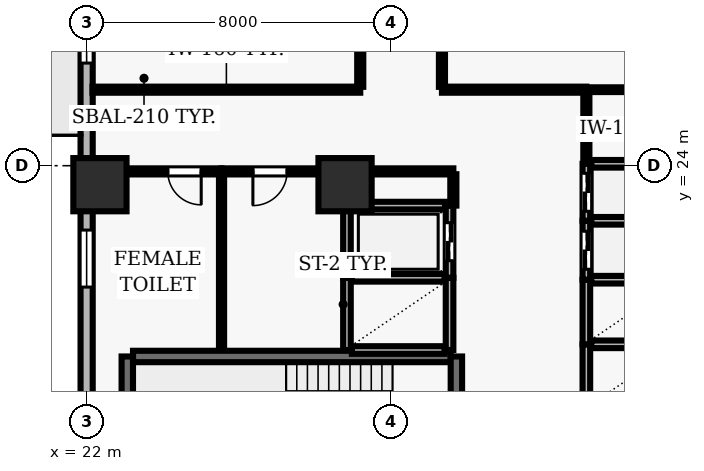
"""IFC4 building model, lengths in metres.
Left out: names, types, materials, properties, quantities, classifications, styles, units other than length and angle.
Written with IfcOpenShell. Run it as: python <this file> out.ifc"""

import sys

from ifc_helpers import new_model, si_unit, direction, frame, frame_2d, origin, origin_2d, place, context, subcontext, project, spatial, rectangle, extrude, element, fill, save


model = new_model("IFC4")
c1 = context("Model", 3, precision=1e-05, world=origin(), true_north=direction((0.0, 1.0)))
c2 = subcontext(c1, "Body", "Model", "MODEL_VIEW")
j1 = project(units=[si_unit("LENGTHUNIT", "METRE"), si_unit("PLANEANGLEUNIT", "RADIAN")], contexts=[c1])
p1 = place(None, origin())
s1 = spatial("IfcSite", under=j1, at=p1, CompositionType="ELEMENT")
p2 = place(p1, origin())
s2 = spatial("IfcBuilding", under=s1, at=p2, CompositionType="ELEMENT")
p3 = place(p2, frame((0.0, 0.0, 73.9)))
s3 = spatial("IfcBuildingStorey", under=s2, at=p3, CompositionType="ELEMENT", Elevation=73.9)
for number, where, z_axis, x_axis in (
    (1, (22.35, 23.5, 0.0), (0.0, 0.0, 1.0), (1.0, 0.0, 0.0)),
    (2, (28.8, 23.5, 0.0), (0.0, 0.0, 1.0), (1.0, 0.0, 0.0)),
):
    element("IfcColumn", number, at=place(p3, frame(where, z_axis=z_axis, x_axis=x_axis)), inside=s3, PredefinedType="COLUMN", context=c2, shape_type="SweptSolid", body=[
        extrude(rectangle(XDim=1.4, YDim=1.4, at=origin_2d()), origin(), (0.0, 0.0, 1.0), 3.9),
    ])
p4 = place(p3, frame((22.0, 51.5, 0.0), z_axis=(0.0, 0.0, 1.0), x_axis=(0.0, -1.0, 0.0)))
e3 = element("IfcWall", 3, at=p4, inside=s3, PredefinedType="SOLIDWALL", context=c2, shape_type="SweptSolid", body=[
    extrude(rectangle(XDim=49.0, YDim=0.32, at=frame_2d((24.5, 0.0))), origin(), (0.0, 0.0, 1.0), 3.69),
])
p5 = place(p4, frame((12.1, 0.0, 0.0)))
e4 = element("IfcOpeningElement", 4, at=p5, cuts=e3, PredefinedType="OPENING", context=c2, shape_type="SweptSolid", body=[
    extrude(rectangle(XDim=1.0, YDim=2.2, at=frame_2d((0.5, 1.1))), frame((0.0, 0.17, 0.0), z_axis=(0.0, -1.0, 0.0), x_axis=(1.0, 0.0, 0.0)), (0.0, 0.0, 1.0), 0.34),
])
p6 = place(p4, frame((1.972, 0.0, 0.9)))
e5 = element("IfcOpeningElement", 5, at=p6, cuts=e3, PredefinedType="OPENING", context=c2, shape_type="SweptSolid", body=[
    extrude(rectangle(XDim=1.5, YDim=1.8, at=frame_2d((0.75, 0.9))), frame((0.0, 0.17, 0.0), z_axis=(0.0, -1.0, 0.0), x_axis=(1.0, 0.0, 0.0)), (0.0, 0.0, 1.0), 0.34),
])
p7 = place(p4, frame((7.417, 0.0, 0.9)))
e6 = element("IfcOpeningElement", 6, at=p7, cuts=e3, PredefinedType="OPENING", context=c2, shape_type="SweptSolid", body=[
    extrude(rectangle(XDim=1.5, YDim=1.8, at=frame_2d((0.75, 0.9))), frame((0.0, 0.17, 0.0), z_axis=(0.0, -1.0, 0.0), x_axis=(1.0, 0.0, 0.0)), (0.0, 0.0, 1.0), 0.34),
])
p8 = place(p4, frame((18.306, 0.0, 0.9)))
e7 = element("IfcOpeningElement", 7, at=p8, cuts=e3, PredefinedType="OPENING", context=c2, shape_type="SweptSolid", body=[
    extrude(rectangle(XDim=1.5, YDim=1.8, at=frame_2d((0.75, 0.9))), frame((0.0, 0.17, 0.0), z_axis=(0.0, -1.0, 0.0), x_axis=(1.0, 0.0, 0.0)), (0.0, 0.0, 1.0), 0.34),
])
p9 = place(p4, frame((23.3, 0.0, 0.9)))
e8 = element("IfcOpeningElement", 8, at=p9, cuts=e3, PredefinedType="OPENING", context=c2, shape_type="SweptSolid", body=[
    extrude(rectangle(XDim=1.5, YDim=1.8, at=frame_2d((0.75, 0.9))), frame((0.0, 0.17, 0.0), z_axis=(0.0, -1.0, 0.0), x_axis=(1.0, 0.0, 0.0)), (0.0, 0.0, 1.0), 0.34),
])
p10 = place(p4, frame((29.194, 0.0, 0.9)))
e9 = element("IfcOpeningElement", 9, at=p10, cuts=e3, PredefinedType="OPENING", context=c2, shape_type="SweptSolid", body=[
    extrude(rectangle(XDim=1.5, YDim=1.8, at=frame_2d((0.75, 0.9))), frame((0.0, 0.17, 0.0), z_axis=(0.0, -1.0, 0.0), x_axis=(1.0, 0.0, 0.0)), (0.0, 0.0, 1.0), 0.34),
])
p11 = place(p4, frame((34.189, 0.0, 0.9)))
e10 = element("IfcOpeningElement", 10, at=p11, cuts=e3, PredefinedType="OPENING", context=c2, shape_type="SweptSolid", body=[
    extrude(rectangle(XDim=1.5, YDim=1.8, at=frame_2d((0.75, 0.9))), frame((0.0, 0.17, 0.0), z_axis=(0.0, -1.0, 0.0), x_axis=(1.0, 0.0, 0.0)), (0.0, 0.0, 1.0), 0.34),
])
p12 = place(p4, frame((40.083, 0.0, 0.9)))
e11 = element("IfcOpeningElement", 11, at=p12, cuts=e3, PredefinedType="OPENING", context=c2, shape_type="SweptSolid", body=[
    extrude(rectangle(XDim=1.5, YDim=1.8, at=frame_2d((0.75, 0.9))), frame((0.0, 0.17, 0.0), z_axis=(0.0, -1.0, 0.0), x_axis=(1.0, 0.0, 0.0)), (0.0, 0.0, 1.0), 0.34),
])
p13 = place(p3, frame((31.58, 18.98, 0.0), z_axis=(0.0, 0.0, 1.0), x_axis=(-1.0, 0.0, 0.0)))
e12 = element("IfcWall", 12, at=p13, inside=s3, PredefinedType="SHEAR", context=c2, shape_type="SweptSolid", body=[
    extrude(rectangle(XDim=8.36, YDim=0.3, at=frame_2d((4.18, 0.0))), origin(), (0.0, 0.0, 1.0), 3.69),
])
p14 = place(p3, frame((23.07, 18.98, 0.0), z_axis=(0.0, 0.0, 1.0), x_axis=(0.0, -1.0, 0.0)))
e13 = element("IfcWall", 13, at=p14, inside=s3, PredefinedType="SHEAR", context=c2, shape_type="SweptSolid", body=[
    extrude(rectangle(XDim=3.51, YDim=0.3, at=frame_2d((1.755, 0.0))), origin(), (0.0, 0.0, 1.0), 3.69),
])
p15 = place(p3, frame((31.73, 15.47, 0.0), z_axis=(0.0, 0.0, 1.0), x_axis=(0.0, 1.0, 0.0)))
e14 = element("IfcWall", 14, at=p15, inside=s3, PredefinedType="SHEAR", context=c2, shape_type="SweptSolid", body=[
    extrude(rectangle(XDim=3.51, YDim=0.3, at=frame_2d((1.755, 0.0))), origin(), (0.0, 0.0, 1.0), 3.69),
])
p16 = place(p15, frame((1.18, 0.0, 0.0)))
e15 = element("IfcOpeningElement", 15, at=p16, cuts=e14, PredefinedType="OPENING", context=c2, shape_type="SweptSolid", body=[
    extrude(rectangle(XDim=1.15, YDim=2.15, at=frame_2d((0.575, 1.075))), frame((0.0, 0.16, 0.0), z_axis=(0.0, -1.0, 0.0), x_axis=(1.0, 0.0, 0.0)), (0.0, 0.0, 1.0), 0.32),
])
p17 = place(p3, frame((35.15, 19.3, 0.0), z_axis=(0.0, 0.0, 1.0), x_axis=(0.0, -1.0, 0.0)))
e16 = element("IfcWall", 16, at=p17, inside=s3, PredefinedType="SOLIDWALL", context=c2, shape_type="SweptSolid", body=[
    extrude(rectangle(XDim=1.7, YDim=0.2, at=frame_2d((0.85, 0.0))), origin(), (0.0, 0.0, 1.0), 3.69),
])
p18 = place(p3, frame((37.42, 19.3, 0.0), z_axis=(0.0, 0.0, 1.0), x_axis=(-1.0, 0.0, 0.0)))
e17 = element("IfcWall", 17, at=p18, inside=s3, PredefinedType="SOLIDWALL", context=c2, shape_type="SweptSolid", body=[
    extrude(rectangle(XDim=2.14, YDim=0.2, at=frame_2d((1.07, 0.0))), origin(), (0.0, 0.0, 1.0), 3.69),
])
p19 = place(p3, frame((35.15, 21.0, 0.0), z_axis=(0.0, 0.0, 1.0), x_axis=(0.0, -1.0, 0.0)))
e18 = element("IfcWall", 18, at=p19, inside=s3, PredefinedType="SOLIDWALL", context=c2, shape_type="SweptSolid", body=[
    extrude(rectangle(XDim=1.7, YDim=0.2, at=frame_2d((0.85, 0.0))), origin(), (0.0, 0.0, 1.0), 3.69),
])
p20 = place(p3, frame((37.42, 21.0, 0.0), z_axis=(0.0, 0.0, 1.0), x_axis=(-1.0, 0.0, 0.0)))
e19 = element("IfcWall", 19, at=p20, inside=s3, PredefinedType="SOLIDWALL", context=c2, shape_type="SweptSolid", body=[
    extrude(rectangle(XDim=2.14, YDim=0.2, at=frame_2d((1.07, 0.0))), origin(), (0.0, 0.0, 1.0), 3.69),
])
for number, where, z_axis, x_axis in (
    (20, (28.85, 21.05, 0.0), (0.0, 0.0, 1.0), (0.0, -1.0, 0.0)),
    (21, (31.55, 19.15, 0.0), (0.0, 0.0, 1.0), (0.0, 1.0, 0.0)),
):
    element("IfcWall", number, at=place(p3, frame(where, z_axis=z_axis, x_axis=x_axis)), inside=s3, PredefinedType="SOLIDWALL", context=c2, shape_type="SweptSolid", body=[
        extrude(rectangle(XDim=1.9, YDim=0.2, at=frame_2d((0.95, 0.0))), origin(), (0.0, 0.0, 1.0), 3.69),
    ])
for number, where, z_axis, x_axis in (
    (22, (28.98, 19.15, 0.0), (0.0, 0.0, 1.0), (1.0, 0.0, 0.0)),
    (23, (31.42, 21.05, 0.0), (0.0, 0.0, 1.0), (-1.0, 0.0, 0.0)),
):
    element("IfcWall", number, at=place(p3, frame(where, z_axis=z_axis, x_axis=x_axis)), inside=s3, PredefinedType="SOLIDWALL", context=c2, shape_type="SweptSolid", body=[
        extrude(rectangle(XDim=2.44, YDim=0.2, at=frame_2d((1.22, 0.0))), origin(), (0.0, 0.0, 1.0), 3.69),
    ])
p21 = place(p3, frame((35.15, 22.55, 0.0), z_axis=(0.0, 0.0, 1.0), x_axis=(0.0, -1.0, 0.0)))
e24 = element("IfcWall", 24, at=p21, inside=s3, PredefinedType="SOLIDWALL", context=c2, shape_type="SweptSolid", body=[
    extrude(rectangle(XDim=1.55, YDim=0.2, at=frame_2d((0.775, 0.0))), origin(), (0.0, 0.0, 1.0), 3.69),
])
p22 = place(p21, frame((0.275, 0.0, 0.0)))
e25 = element("IfcOpeningElement", 25, at=p22, cuts=e24, PredefinedType="OPENING", context=c2, shape_type="SweptSolid", body=[
    extrude(rectangle(XDim=1.0, YDim=2.1, at=frame_2d((0.5, 1.05))), frame((0.0, 0.11, 0.0), z_axis=(0.0, -1.0, 0.0), x_axis=(1.0, 0.0, 0.0)), (0.0, 0.0, 1.0), 0.22),
])
p23 = place(p3, frame((37.42, 22.55, 0.0), z_axis=(0.0, 0.0, 1.0), x_axis=(-1.0, 0.0, 0.0)))
e26 = element("IfcWall", 26, at=p23, inside=s3, PredefinedType="SOLIDWALL", context=c2, shape_type="SweptSolid", body=[
    extrude(rectangle(XDim=2.14, YDim=0.2, at=frame_2d((1.07, 0.0))), origin(), (0.0, 0.0, 1.0), 3.69),
])
p24 = place(p3, frame((35.15, 24.05, 0.0), z_axis=(0.0, 0.0, 1.0), x_axis=(0.0, -1.0, 0.0)))
e27 = element("IfcWall", 27, at=p24, inside=s3, PredefinedType="SOLIDWALL", context=c2, shape_type="SweptSolid", body=[
    extrude(rectangle(XDim=1.5, YDim=0.2, at=frame_2d((0.75, 0.0))), origin(), (0.0, 0.0, 1.0), 3.69),
])
p25 = place(p24, frame((0.25, 0.0, 0.0)))
e28 = element("IfcOpeningElement", 28, at=p25, cuts=e27, PredefinedType="OPENING", context=c2, shape_type="SweptSolid", body=[
    extrude(rectangle(XDim=1.0, YDim=2.1, at=frame_2d((0.5, 1.05))), frame((0.0, 0.11, 0.0), z_axis=(0.0, -1.0, 0.0), x_axis=(1.0, 0.0, 0.0)), (0.0, 0.0, 1.0), 0.22),
])
p26 = place(p3, frame((37.42, 24.05, 0.0), z_axis=(0.0, 0.0, 1.0), x_axis=(-1.0, 0.0, 0.0)))
e29 = element("IfcWall", 29, at=p26, inside=s3, PredefinedType="SOLIDWALL", context=c2, shape_type="SweptSolid", body=[
    extrude(rectangle(XDim=2.14, YDim=0.2, at=frame_2d((1.07, 0.0))), origin(), (0.0, 0.0, 1.0), 3.69),
])
p27 = place(p3, frame((28.85, 22.95, 0.0), z_axis=(0.0, 0.0, 1.0), x_axis=(0.0, -1.0, 0.0)))
e30 = element("IfcWall", 30, at=p27, inside=s3, PredefinedType="SOLIDWALL", context=c2, shape_type="SweptSolid", body=[
    extrude(rectangle(XDim=1.9, YDim=0.2, at=frame_2d((0.95, 0.0))), origin(), (0.0, 0.0, 1.0), 3.69),
])
p28 = place(p3, frame((31.55, 21.05, 0.0), z_axis=(0.0, 0.0, 1.0), x_axis=(0.0, 1.0, 0.0)))
e31 = element("IfcWall", 31, at=p28, inside=s3, PredefinedType="SOLIDWALL", context=c2, shape_type="SweptSolid", body=[
    extrude(rectangle(XDim=1.9, YDim=0.2, at=frame_2d((0.95, 0.0))), origin(), (0.0, 0.0, 1.0), 3.69),
])
p29 = place(p28, frame((0.45, 0.0, 0.0)))
e32 = element("IfcOpeningElement", 32, at=p29, cuts=e31, PredefinedType="OPENING", context=c2, shape_type="SweptSolid", body=[
    extrude(rectangle(XDim=1.0, YDim=2.1, at=frame_2d((0.5, 1.05))), frame((0.0, 0.11, 0.0), z_axis=(0.0, -1.0, 0.0), x_axis=(1.0, 0.0, 0.0)), (0.0, 0.0, 1.0), 0.22),
])
p30 = place(p3, frame((31.43, 22.95, 0.0), z_axis=(0.0, 0.0, 1.0), x_axis=(-1.0, 0.0, 0.0)))
e33 = element("IfcWall", 33, at=p30, inside=s3, PredefinedType="SOLIDWALL", context=c2, shape_type="SweptSolid", body=[
    extrude(rectangle(XDim=2.46, YDim=0.2, at=frame_2d((1.23, 0.0))), origin(), (0.0, 0.0, 1.0), 3.69),
])
p31 = place(p3, frame((25.55, 23.85, 0.0), z_axis=(0.0, 0.0, 1.0), x_axis=(-1.0, 0.0, 0.0)))
e34 = element("IfcWall", 34, at=p31, inside=s3, PredefinedType="PARTITIONING", context=c2, shape_type="SweptSolid", body=[
    extrude(rectangle(XDim=3.35, YDim=0.16, at=frame_2d((1.675, 0.0))), origin(), (0.0, 0.0, 1.0), 3.055),
])
p32 = place(p31, frame((0.535, 0.0, 0.0)))
e35 = element("IfcOpeningElement", 35, at=p32, cuts=e34, PredefinedType="OPENING", context=c2, shape_type="SweptSolid", body=[
    extrude(rectangle(XDim=0.88, YDim=2.1, at=frame_2d((0.44, 1.05))), frame((0.0, 0.09, 0.0), z_axis=(0.0, -1.0, 0.0), x_axis=(1.0, 0.0, 0.0)), (0.0, 0.0, 1.0), 0.18),
])
p33 = place(p3, frame((28.8, 23.85, 0.0), z_axis=(0.0, 0.0, 1.0), x_axis=(-1.0, 0.0, 0.0)))
e36 = element("IfcWall", 36, at=p33, inside=s3, PredefinedType="PARTITIONING", context=c2, shape_type="SweptSolid", body=[
    extrude(rectangle(XDim=3.25, YDim=0.16, at=frame_2d((1.625, 0.0))), origin(), (0.0, 0.0, 1.0), 3.055),
])
p34 = place(p33, frame((1.525, 0.0, 0.0)))
e37 = element("IfcOpeningElement", 37, at=p34, cuts=e36, PredefinedType="OPENING", context=c2, shape_type="SweptSolid", body=[
    extrude(rectangle(XDim=0.9, YDim=2.1, at=frame_2d((0.45, 1.05))), frame((0.0, 0.09, 0.0), z_axis=(0.0, -1.0, 0.0), x_axis=(1.0, 0.0, 0.0)), (0.0, 0.0, 1.0), 0.18),
])
p35 = place(p3, frame((28.8, 23.85, 0.0), z_axis=(0.0, 0.0, 1.0), x_axis=(1.0, 0.0, 0.0)))
e38 = element("IfcWall", 38, at=p35, inside=s3, PredefinedType="PARTITIONING", context=c2, shape_type="SweptSolid", body=[
    extrude(rectangle(XDim=2.85, YDim=0.16, at=frame_2d((1.425, 0.0))), origin(), (0.0, 0.0, 1.0), 3.69),
])
p36 = place(p3, frame((29.2, 26.0, 0.0), z_axis=(0.0, 0.0, 1.0), x_axis=(-1.0, 0.0, 0.0)))
e39 = element("IfcWall", 39, at=p36, inside=s3, PredefinedType="PARTITIONING", context=c2, shape_type="SweptSolid", body=[
    extrude(rectangle(XDim=7.045, YDim=0.16, at=frame_2d((3.522, 0.0))), origin(), (0.0, 0.0, 1.0), 3.69),
])
p37 = place(p3, frame((35.15, 26.0, 0.0), z_axis=(0.0, 0.0, 1.0), x_axis=(-1.0, 0.0, 0.0)))
e40 = element("IfcWall", 40, at=p37, inside=s3, PredefinedType="PARTITIONING", context=c2, shape_type="SweptSolid", body=[
    extrude(rectangle(XDim=3.8, YDim=0.16, at=frame_2d((1.9, 0.0))), origin(), (0.0, 0.0, 1.0), 3.69),
])
p38 = place(p3, frame((35.15, 26.0, 0.0), z_axis=(0.0, 0.0, 1.0), x_axis=(1.0, 0.0, 0.0)))
e41 = element("IfcWall", 41, at=p38, inside=s3, PredefinedType="PARTITIONING", context=c2, shape_type="SweptSolid", body=[
    extrude(rectangle(XDim=2.695, YDim=0.125, at=frame_2d((1.348, 0.0))), origin(), (0.0, 0.0, 1.0), 3.69),
])
p39 = place(p3, frame((25.55, 19.16, 0.0), z_axis=(0.0, 0.0, 1.0), x_axis=(0.0, 1.0, 0.0)))
e42 = element("IfcWall", 42, at=p39, inside=s3, PredefinedType="PARTITIONING", context=c2, shape_type="SweptSolid", body=[
    extrude(rectangle(XDim=4.615, YDim=0.135, at=frame_2d((2.308, 0.0))), origin(), (0.0, 0.0, 1.0), 3.69),
])
p40 = place(p3, frame((28.8, 22.95, 0.0), z_axis=(0.0, 0.0, 1.0), x_axis=(0.0, 1.0, 0.0)))
e43 = element("IfcWall", 43, at=p40, inside=s3, PredefinedType="PARTITIONING", context=c2, shape_type="SweptSolid", body=[
    extrude(rectangle(XDim=0.825, YDim=0.125, at=frame_2d((0.413, 0.0))), origin(), (0.0, 0.0, 1.0), 3.69),
])
p41 = place(p3, frame((29.2, 53.845, 0.0), z_axis=(0.0, 0.0, 1.0), x_axis=(0.0, -1.0, 0.0)))
e44 = element("IfcWall", 44, at=p41, inside=s3, PredefinedType="PARTITIONING", context=c2, shape_type="SweptSolid", body=[
    extrude(rectangle(XDim=27.77, YDim=0.16, at=frame_2d((13.885, 0.0))), origin(), (0.0, 0.0, 1.0), 3.69),
])
p42 = place(p41, frame((13.435, 0.0, 0.0)))
e45 = element("IfcOpeningElement", 45, at=p42, cuts=e44, PredefinedType="OPENING", context=c2, shape_type="SweptSolid", body=[
    extrude(rectangle(XDim=0.9, YDim=2.1, at=frame_2d((0.45, 1.05))), frame((0.0, 0.09, 0.0), z_axis=(0.0, -1.0, 0.0), x_axis=(1.0, 0.0, 0.0)), (0.0, 0.0, 1.0), 0.18),
])
p43 = place(p3, frame((31.35, 26.075, 0.0), z_axis=(0.0, 0.0, 1.0), x_axis=(0.0, 1.0, 0.0)))
e46 = element("IfcWall", 46, at=p43, inside=s3, PredefinedType="PARTITIONING", context=c2, shape_type="SweptSolid", body=[
    extrude(rectangle(XDim=27.77, YDim=0.16, at=frame_2d((13.885, 0.0))), origin(), (0.0, 0.0, 1.0), 3.69),
])
p44 = place(p43, frame((13.435, 0.0, 0.0)))
e47 = element("IfcOpeningElement", 47, at=p44, cuts=e46, PredefinedType="OPENING", context=c2, shape_type="SweptSolid", body=[
    extrude(rectangle(XDim=0.9, YDim=2.1, at=frame_2d((0.45, 1.05))), frame((0.0, 0.09, 0.0), z_axis=(0.0, -1.0, 0.0), x_axis=(1.0, 0.0, 0.0)), (0.0, 0.0, 1.0), 0.18),
])
p45 = place(p3, frame((31.65, 23.775, 0.0), z_axis=(0.0, 0.0, 1.0), x_axis=(0.0, -1.0, 0.0)))
e48 = element("IfcWall", 48, at=p45, inside=s3, PredefinedType="PARTITIONING", context=c2, shape_type="SweptSolid", body=[
    extrude(rectangle(XDim=0.825, YDim=0.16, at=frame_2d((0.413, 0.0))), origin(), (0.0, 0.0, 1.0), 3.69),
])
p46 = place(p3, frame((35.15, 24.07, 0.0), z_axis=(0.0, 0.0, 1.0), x_axis=(0.0, 1.0, 0.0)))
e49 = element("IfcWall", 49, at=p46, inside=s3, PredefinedType="PARTITIONING", context=c2, shape_type="SweptSolid", body=[
    extrude(rectangle(XDim=1.855, YDim=0.16, at=frame_2d((0.927, 0.0))), origin(), (0.0, 0.0, 1.0), 3.69),
])
p47 = place(p9, origin())
e50 = element("IfcWindow", 50, at=p47, inside=s3, PartitioningType="SINGLE_PANEL", PredefinedType="WINDOW", context=c2, shape_type="SweptSolid", body=[
    extrude(rectangle(XDim=1.5, YDim=1.8, at=frame_2d((0.75, 0.9))), frame((0.0, 0.03, 0.0), z_axis=(0.0, -1.0, 0.0), x_axis=(1.0, 0.0, 0.0)), (0.0, 0.0, 1.0), 0.06),
])
fill(e8, e50)
p48 = place(p10, origin())
e51 = element("IfcWindow", 51, at=p48, inside=s3, PartitioningType="SINGLE_PANEL", PredefinedType="WINDOW", context=c2, shape_type="SweptSolid", body=[
    extrude(rectangle(XDim=1.5, YDim=1.8, at=frame_2d((0.75, 0.9))), frame((0.0, 0.03, 0.0), z_axis=(0.0, -1.0, 0.0), x_axis=(1.0, 0.0, 0.0)), (0.0, 0.0, 1.0), 0.06),
])
fill(e9, e51)
p49 = place(p22, origin())
e52 = element("IfcDoor", 52, at=p49, inside=s3, OperationType="DOUBLE_DOOR_SLIDING", PredefinedType="DOOR", context=c2, shape_type="SweptSolid", body=[
    extrude(rectangle(XDim=1.0, YDim=2.1, at=frame_2d((0.5, 1.05))), frame((0.0, 0.025, 0.0), z_axis=(0.0, -1.0, 0.0), x_axis=(1.0, 0.0, 0.0)), (0.0, 0.0, 1.0), 0.05),
])
fill(e25, e52)
p50 = place(p25, origin())
e53 = element("IfcDoor", 53, at=p50, inside=s3, OperationType="DOUBLE_DOOR_SLIDING", PredefinedType="DOOR", context=c2, shape_type="SweptSolid", body=[
    extrude(rectangle(XDim=1.0, YDim=2.1, at=frame_2d((0.5, 1.05))), frame((0.0, 0.025, 0.0), z_axis=(0.0, -1.0, 0.0), x_axis=(1.0, 0.0, 0.0)), (0.0, 0.0, 1.0), 0.05),
])
fill(e28, e53)
p51 = place(p29, origin())
e54 = element("IfcDoor", 54, at=p51, inside=s3, OperationType="DOUBLE_DOOR_SLIDING", PredefinedType="DOOR", context=c2, shape_type="SweptSolid", body=[
    extrude(rectangle(XDim=1.0, YDim=2.1, at=frame_2d((0.5, 1.05))), frame((0.0, 0.025, 0.0), z_axis=(0.0, -1.0, 0.0), x_axis=(1.0, 0.0, 0.0)), (0.0, 0.0, 1.0), 0.05),
])
fill(e32, e54)
p52 = place(p32, origin())
e55 = element("IfcDoor", 55, at=p52, inside=s3, OperationType="SINGLE_SWING_LEFT", PredefinedType="DOOR", context=c2, shape_type="SweptSolid", body=[
    extrude(rectangle(XDim=0.88, YDim=2.1, at=frame_2d((0.44, 1.05))), frame((0.0, 0.025, 0.0), z_axis=(0.0, -1.0, 0.0), x_axis=(1.0, 0.0, 0.0)), (0.0, 0.0, 1.0), 0.05),
])
fill(e35, e55)
p53 = place(p34, origin())
e56 = element("IfcDoor", 56, at=p53, inside=s3, OperationType="SINGLE_SWING_RIGHT", PredefinedType="DOOR", context=c2, shape_type="SweptSolid", body=[
    extrude(rectangle(XDim=0.9, YDim=2.1, at=frame_2d((0.45, 1.05))), frame((0.0, 0.025, 0.0), z_axis=(0.0, -1.0, 0.0), x_axis=(1.0, 0.0, 0.0)), (0.0, 0.0, 1.0), 0.05),
])
fill(e37, e56)
save(model, sys.argv[1])
